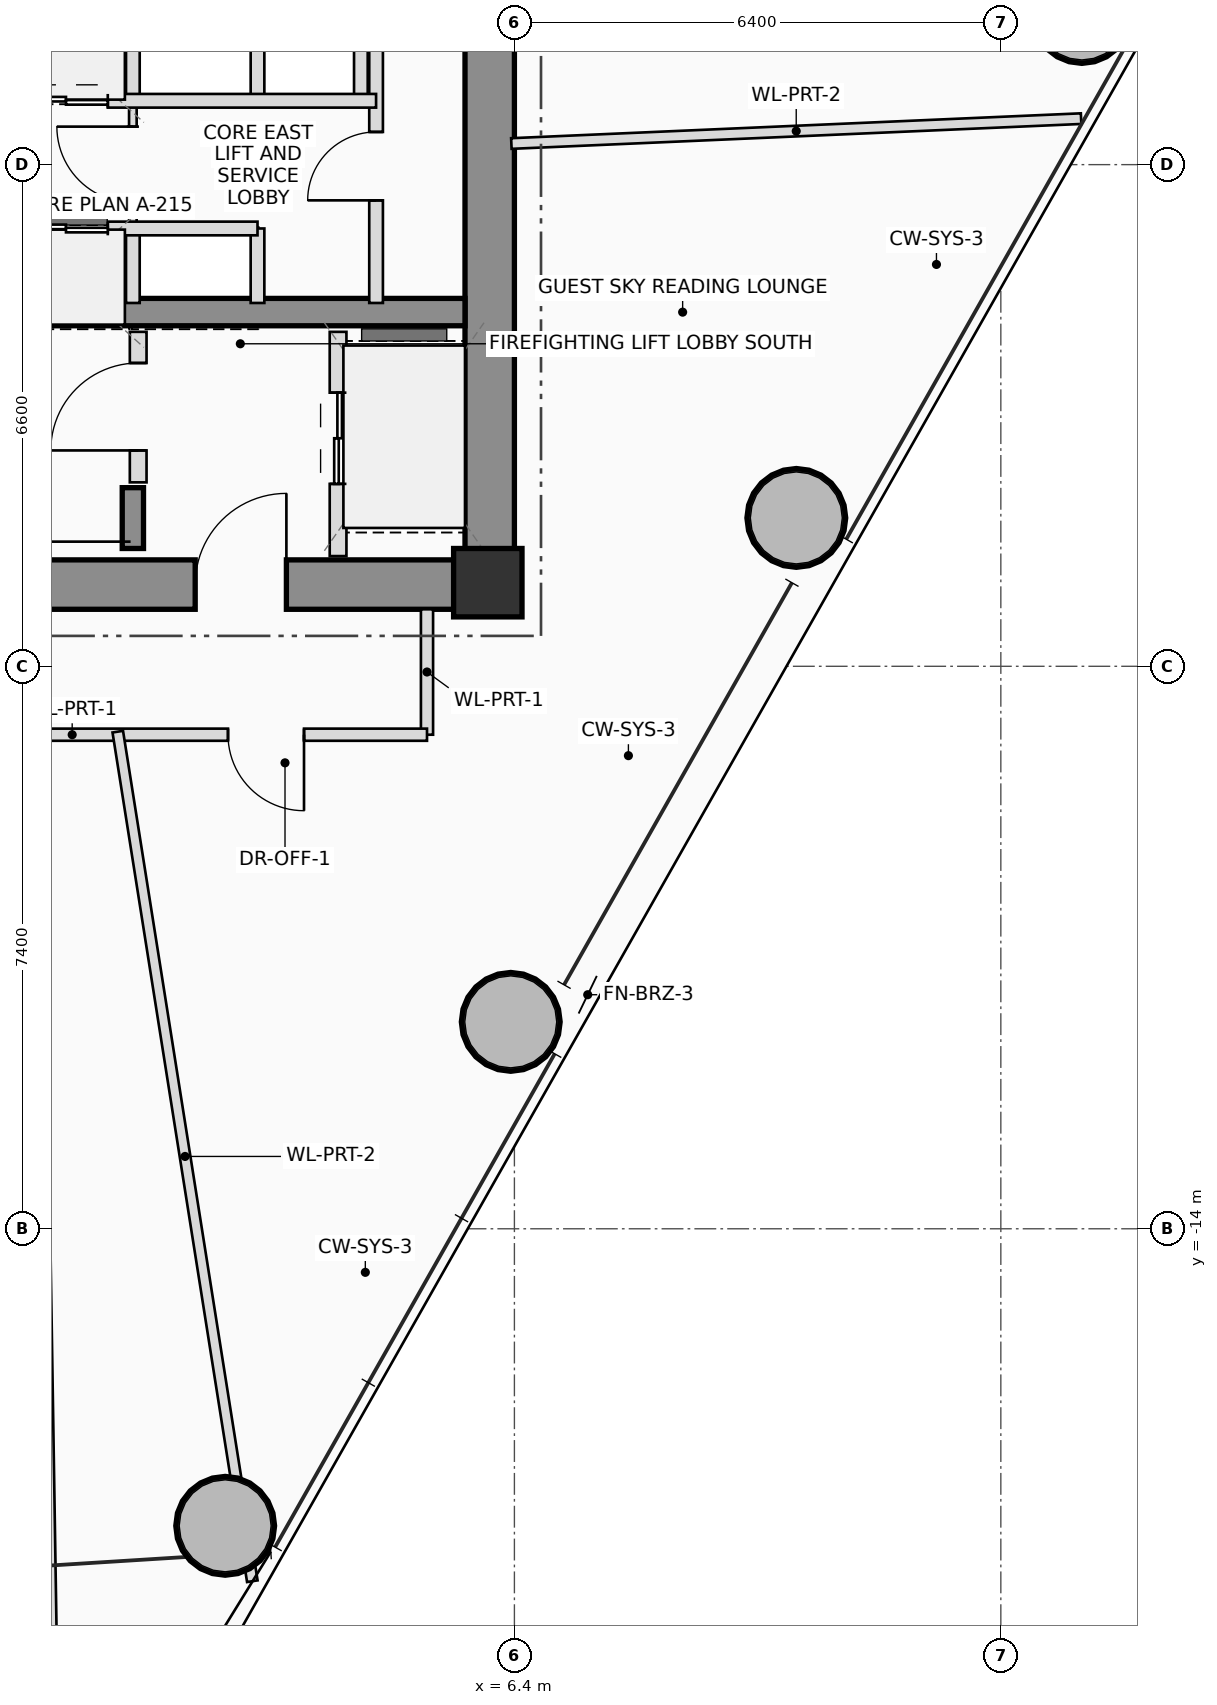
"""IFC4 building model, lengths in metres.
Left out: names, types, materials, properties, quantities, classifications, styles, units other than length and angle.
Written with IfcOpenShell. Run it as: python <this file> out.ifc"""

import sys

from ifc_helpers import new_model, si_unit, direction, frame, frame_2d, origin, origin_2d, place, context, subcontext, project, spatial, rectangle, hollow_circle, extrude, source, transform, mapped, element, fill, save


model = new_model("IFC4")
c1 = context("Model", 3, precision=1e-05, world=origin(), true_north=direction((0.0, 1.0)))
c2 = subcontext(c1, "Body", "Model", "MODEL_VIEW")
j1 = project(units=[si_unit("LENGTHUNIT", "METRE"), si_unit("PLANEANGLEUNIT", "RADIAN")], contexts=[c1])
p1 = place(None, origin())
s1 = spatial("IfcSite", under=j1, at=p1, CompositionType="ELEMENT")
p2 = place(p1, origin())
s2 = spatial("IfcBuilding", under=s1, at=p2, CompositionType="ELEMENT")
p3 = place(p2, frame((0.0, 0.0, 158.75)))
s3 = spatial("IfcBuildingStorey", under=s2, at=p3, CompositionType="ELEMENT", Elevation=158.75)
m1 = source(origin(), c2, "Body", "SweptSolid", [
    extrude(rectangle(XDim=0.9, YDim=0.9, at=origin_2d()), origin(), (0.0, 0.0, 1.0), 3.45),
])
p4 = place(p3, frame((6.05, -5.5, 0.0), z_axis=(0.0, 0.0, 1.0), x_axis=(1.0, 0.0, 0.0)))
e1 = element("IfcColumn", 1, at=p4, inside=s3, PredefinedType="COLUMN", context=c2, shape_type="MappedRepresentation", body=[
    mapped(m1, transform((0.0, 0.0, 0.0), scale=1.0)),
])
p5 = place(p3, frame((-6.4, -5.525, 0.0), z_axis=(0.0, 0.0, 1.0), x_axis=(1.0, 0.0, 0.0)))
e2 = element("IfcWall", 2, at=p5, inside=s3, PredefinedType="SHEAR", context=c2, shape_type="SweptSolid", body=[
    extrude(rectangle(XDim=12.8, YDim=0.65, at=frame_2d((6.4, 0.0))), origin(), (0.0, 0.0, 1.0), 3.45),
])
p6 = place(p5, frame((8.6, 0.0, 0.0)))
e3 = element("IfcOpeningElement", 3, at=p6, cuts=e2, PredefinedType="OPENING", context=c2, shape_type="SweptSolid", body=[
    extrude(rectangle(XDim=1.2, YDim=2.2, at=frame_2d((0.6, 1.1))), frame((0.0, 0.335, 0.0), z_axis=(0.0, -1.0, 0.0), x_axis=(1.0, 0.0, 0.0)), (0.0, 0.0, 1.0), 0.67),
])
p7 = place(p3, frame((6.075, -5.2, 0.0), z_axis=(0.0, 0.0, 1.0), x_axis=(0.0, 1.0, 0.0)))
e4 = element("IfcWall", 4, at=p7, inside=s3, PredefinedType="SHEAR", context=c2, shape_type="SweptSolid", body=[
    extrude(rectangle(XDim=10.4, YDim=0.65, at=frame_2d((5.2, 0.0))), origin(), (0.0, 0.0, 1.0), 3.45),
])
p8 = place(p3, frame((-5.75, -1.94, 0.0), z_axis=(0.0, 0.0, 1.0), x_axis=(1.0, 0.0, 0.0)))
e5 = element("IfcWall", 5, at=p8, inside=s3, PredefinedType="SHEAR", context=c2, shape_type="SweptSolid", body=[
    extrude(rectangle(XDim=11.5, YDim=0.36, at=frame_2d((5.75, 0.0))), origin(), (0.0, 0.0, 1.0), 3.45),
])
p9 = place(p3, frame((1.38, -5.05, 0.0), z_axis=(0.0, 0.0, 1.0), x_axis=(0.0, 1.0, 0.0)))
e6 = element("IfcWall", 6, at=p9, inside=s3, PredefinedType="SHEAR", context=c2, shape_type="SweptSolid", body=[
    extrude(rectangle(XDim=0.8, YDim=0.28, at=frame_2d((0.4, 0.0))), origin(), (0.0, 0.0, 1.0), 3.45),
])
m2 = source(origin(), c2, "Body", "SweptSolid", [
    extrude(hollow_circle(Radius=0.65, WallThickness=0.045, at=origin_2d()), origin(), (0.0, 0.0, 1.0), 3.45),
])
for number, where, z_axis, x_axis in (
    (7, (2.595, -17.908, 0.0), (0.0, 0.0, 1.0), (1.0, 0.0, 0.0)),
    (8, (6.352, -11.278, 0.0), (0.0, 0.0, 1.0), (1.0, 0.0, 0.0)),
    (9, (10.109, -4.648, 0.0), (0.0, 0.0, 1.0), (1.0, 0.0, 0.0)),
    (10, (13.866, 1.982, 0.0), (0.0, 0.0, 1.0), (1.0, 0.0, 0.0)),
):
    element("IfcColumn", number, at=place(p3, frame(where, z_axis=z_axis, x_axis=x_axis)), inside=s3, PredefinedType="COLUMN", context=c2, shape_type="MappedRepresentation", body=[
        mapped(m2, transform((0.0, 0.0, 0.0), scale=1.0)),
    ])
p10 = place(p3, frame((1.45, -4.18, 0.0), z_axis=(0.0, 0.0, 1.0), x_axis=(0.0, 1.0, 0.0)))
e11 = element("IfcWall", 11, at=p10, inside=s3, PredefinedType="PLUMBINGWALL", context=c2, shape_type="SweptSolid", body=[
    extrude(rectangle(XDim=1.98, YDim=0.22, at=frame_2d((0.99, 0.0))), origin(), (0.0, 0.0, 1.0), 3.25),
])
p11 = place(p10, frame((0.42, 0.0, 0.0)))
e12 = element("IfcOpeningElement", 12, at=p11, cuts=e11, PredefinedType="OPENING", context=c2, shape_type="SweptSolid", body=[
    extrude(rectangle(XDim=1.15, YDim=2.15, at=frame_2d((0.575, 1.075))), frame((0.0, 0.12, 0.0), z_axis=(0.0, -1.0, 0.0), x_axis=(1.0, 0.0, 0.0)), (0.0, 0.0, 1.0), 0.24),
])
p12 = place(p3, frame((4.08, -5.15, 0.0), z_axis=(0.0, 0.0, 1.0), x_axis=(0.0, 1.0, 0.0)))
e13 = element("IfcWall", 13, at=p12, inside=s3, PredefinedType="PLUMBINGWALL", context=c2, shape_type="SweptSolid", body=[
    extrude(rectangle(XDim=2.95, YDim=0.22, at=frame_2d((1.475, 0.0))), origin(), (0.0, 0.0, 1.0), 3.25),
])
p13 = place(p12, frame((0.95, 0.0, 0.0)))
e14 = element("IfcOpeningElement", 14, at=p13, cuts=e13, PredefinedType="OPENING", context=c2, shape_type="SweptSolid", body=[
    extrude(rectangle(XDim=1.2, YDim=2.25, at=frame_2d((0.6, 1.125))), frame((0.0, 0.12, 0.0), z_axis=(0.0, -1.0, 0.0), x_axis=(1.0, 0.0, 0.0)), (0.0, 0.0, 1.0), 0.24),
])
p14 = place(p3, frame((1.38, -0.84, 0.0), z_axis=(0.0, 0.0, 1.0), x_axis=(0.0, 1.0, 0.0)))
e15 = element("IfcWall", 15, at=p14, inside=s3, PredefinedType="PARTITIONING", context=c2, shape_type="SweptSolid", body=[
    extrude(rectangle(XDim=1.68, YDim=0.1, at=frame_2d((0.84, 0.0))), origin(), (0.0, 0.0, 1.0), 3.25),
])
p15 = place(p14, frame((0.34, 0.0, 0.0)))
e16 = element("IfcOpeningElement", 16, at=p15, cuts=e15, PredefinedType="OPENING", context=c2, shape_type="SweptSolid", body=[
    extrude(rectangle(XDim=1.0, YDim=2.25, at=frame_2d((0.5, 1.125))), frame((0.0, 0.06, 0.0), z_axis=(0.0, -1.0, 0.0), x_axis=(1.0, 0.0, 0.0)), (0.0, 0.0, 1.0), 0.12),
])
for number, where, z_axis, x_axis in (
    (17, (1.38, 0.84, 0.0), (0.0, 0.0, 1.0), (0.0, 1.0, 0.0)),
    (18, (1.38, -1.82, 0.0), (0.0, 0.0, 1.0), (0.0, 1.0, 0.0)),
    (19, (3.02, 0.84, 0.0), (0.0, 0.0, 1.0), (0.0, 1.0, 0.0)),
    (20, (4.38, 0.84, 0.0), (0.0, 0.0, 1.0), (0.0, 1.0, 0.0)),
    (21, (3.02, -1.82, 0.0), (0.0, 0.0, 1.0), (0.0, 1.0, 0.0)),
):
    element("IfcWall", number, at=place(p3, frame(where, z_axis=z_axis, x_axis=x_axis)), inside=s3, PredefinedType="PLUMBINGWALL", context=c2, shape_type="SweptSolid", body=[
        extrude(rectangle(XDim=0.98, YDim=0.18, at=frame_2d((0.49, 0.0))), origin(), (0.0, 0.0, 1.0), 3.25),
    ])
p16 = place(p3, frame((4.58, -1.82, 0.0), z_axis=(0.0, 0.0, 1.0), x_axis=(0.0, 1.0, 0.0)))
e22 = element("IfcWall", 22, at=p16, inside=s3, PredefinedType="PLUMBINGWALL", context=c2, shape_type="SweptSolid", body=[
    extrude(rectangle(XDim=3.64, YDim=0.18, at=frame_2d((1.82, 0.0))), origin(), (0.0, 0.0, 1.0), 3.25),
])
p17 = place(p16, frame((1.35, 0.0, 0.0)))
e23 = element("IfcOpeningElement", 23, at=p17, cuts=e22, PredefinedType="OPENING", context=c2, shape_type="SweptSolid", body=[
    extrude(rectangle(XDim=0.9, YDim=2.05, at=frame_2d((0.45, 1.025))), frame((0.0, 0.1, 0.0), z_axis=(0.0, -1.0, 0.0), x_axis=(1.0, 0.0, 0.0)), (0.0, 0.0, 1.0), 0.2),
])
p18 = place(p3, frame((-5.68, 0.84, 0.0), z_axis=(0.0, 0.0, 1.0), x_axis=(1.0, 0.0, 0.0)))
e24 = element("IfcWall", 24, at=p18, inside=s3, PredefinedType="PLUMBINGWALL", context=c2, shape_type="SweptSolid", body=[
    extrude(rectangle(XDim=10.26, YDim=0.18, at=frame_2d((5.13, 0.0))), origin(), (0.0, 0.0, 1.0), 3.25),
])
p19 = place(p18, frame((1.08, 0.0, 0.0)))
e25 = element("IfcOpeningElement", 25, at=p19, cuts=e24, PredefinedType="OPENING", context=c2, shape_type="SweptSolid", body=[
    extrude(rectangle(XDim=0.9, YDim=2.05, at=frame_2d((0.45, 1.025))), frame((0.0, 0.1, 0.0), z_axis=(0.0, -1.0, 0.0), x_axis=(1.0, 0.0, 0.0)), (0.0, 0.0, 1.0), 0.2),
])
p20 = place(p18, frame((3.93, 0.0, 0.0)))
e26 = element("IfcOpeningElement", 26, at=p20, cuts=e24, PredefinedType="OPENING", context=c2, shape_type="SweptSolid", body=[
    extrude(rectangle(XDim=1.1, YDim=2.2, at=frame_2d((0.55, 1.1))), frame((0.0, 0.1, 0.0), z_axis=(0.0, -1.0, 0.0), x_axis=(1.0, 0.0, 0.0)), (0.0, 0.0, 1.0), 0.2),
])
p21 = place(p18, frame((5.63, 0.0, 0.0)))
e27 = element("IfcOpeningElement", 27, at=p21, cuts=e24, PredefinedType="OPENING", context=c2, shape_type="SweptSolid", body=[
    extrude(rectangle(XDim=1.1, YDim=2.2, at=frame_2d((0.55, 1.1))), frame((0.0, 0.1, 0.0), z_axis=(0.0, -1.0, 0.0), x_axis=(1.0, 0.0, 0.0)), (0.0, 0.0, 1.0), 0.2),
])
p22 = place(p3, frame((-5.68, -0.84, 0.0), z_axis=(0.0, 0.0, 1.0), x_axis=(1.0, 0.0, 0.0)))
e28 = element("IfcWall", 28, at=p22, inside=s3, PredefinedType="PLUMBINGWALL", context=c2, shape_type="SweptSolid", body=[
    extrude(rectangle(XDim=8.7, YDim=0.18, at=frame_2d((4.35, 0.0))), origin(), (0.0, 0.0, 1.0), 3.25),
])
p23 = place(p22, frame((1.68, 0.0, 0.0)))
e29 = element("IfcOpeningElement", 29, at=p23, cuts=e28, PredefinedType="OPENING", context=c2, shape_type="SweptSolid", body=[
    extrude(rectangle(XDim=0.9, YDim=2.05, at=frame_2d((0.45, 1.025))), frame((0.0, 0.1, 0.0), z_axis=(0.0, -1.0, 0.0), x_axis=(1.0, 0.0, 0.0)), (0.0, 0.0, 1.0), 0.2),
])
p24 = place(p22, frame((3.93, 0.0, 0.0)))
e30 = element("IfcOpeningElement", 30, at=p24, cuts=e28, PredefinedType="OPENING", context=c2, shape_type="SweptSolid", body=[
    extrude(rectangle(XDim=1.1, YDim=2.2, at=frame_2d((0.55, 1.1))), frame((0.0, 0.1, 0.0), z_axis=(0.0, -1.0, 0.0), x_axis=(1.0, 0.0, 0.0)), (0.0, 0.0, 1.0), 0.2),
])
p25 = place(p22, frame((5.63, 0.0, 0.0)))
e31 = element("IfcOpeningElement", 31, at=p25, cuts=e28, PredefinedType="OPENING", context=c2, shape_type="SweptSolid", body=[
    extrude(rectangle(XDim=1.1, YDim=2.2, at=frame_2d((0.55, 1.1))), frame((0.0, 0.1, 0.0), z_axis=(0.0, -1.0, 0.0), x_axis=(1.0, 0.0, 0.0)), (0.0, 0.0, 1.0), 0.2),
])
p26 = place(p3, frame((5.25, -5.85, 0.0), z_axis=(0.0, 0.0, 1.0), x_axis=(0.0, -1.0, 0.0)))
e32 = element("IfcWall", 32, at=p26, inside=s3, PredefinedType="PARTITIONING", context=c2, shape_type="SweptSolid", body=[
    extrude(rectangle(XDim=1.65, YDim=0.16, at=frame_2d((0.825, 0.0))), origin(), (0.0, 0.0, 1.0), 3.25),
])
p27 = place(p3, frame((5.25, -7.5, 0.0), z_axis=(0.0, 0.0, 1.0), x_axis=(-1.0, 0.0, 0.0)))
e33 = element("IfcWall", 33, at=p27, inside=s3, PredefinedType="PARTITIONING", context=c2, shape_type="SweptSolid", body=[
    extrude(rectangle(XDim=11.61, YDim=0.16, at=frame_2d((5.805, 0.0))), origin(), (0.0, 0.0, 1.0), 2.605),
])
p28 = place(p27, frame((1.618, 0.0, 0.0)))
e34 = element("IfcOpeningElement", 34, at=p28, cuts=e33, PredefinedType="OPENING", context=c2, shape_type="SweptSolid", body=[
    extrude(rectangle(XDim=1.0, YDim=2.25, at=frame_2d((0.5, 1.125))), frame((0.0, 0.09, 0.0), z_axis=(0.0, -1.0, 0.0), x_axis=(1.0, 0.0, 0.0)), (0.0, 0.0, 1.0), 0.18),
])
p29 = place(p27, frame((6.719, 0.0, 0.0)))
e35 = element("IfcOpeningElement", 35, at=p29, cuts=e33, PredefinedType="OPENING", context=c2, shape_type="SweptSolid", body=[
    extrude(rectangle(XDim=1.0, YDim=2.25, at=frame_2d((0.5, 1.125))), frame((0.0, 0.09, 0.0), z_axis=(0.0, -1.0, 0.0), x_axis=(1.0, 0.0, 0.0)), (0.0, 0.0, 1.0), 0.18),
])
p30 = place(p3, frame((6.36, 0.278, 0.0), z_axis=(0.0, 0.0, 1.0), x_axis=(0.999047543566, 0.043634913719, 0.0)))
e36 = element("IfcWall", 36, at=p30, inside=s3, PredefinedType="PARTITIONING", context=c2, shape_type="SweptSolid", body=[
    extrude(rectangle(XDim=7.503, YDim=0.14, at=frame_2d((3.751, 0.0))), origin(), (0.0, 0.0, 1.0), 2.605),
])
p31 = place(p3, frame((0.118, -7.46, 0.0), z_axis=(0.0, 0.0, 1.0), x_axis=(0.015859383496, -0.999874232069, 0.0)))
e37 = element("IfcWall", 37, at=p31, inside=s3, PredefinedType="PARTITIONING", context=c2, shape_type="SweptSolid", body=[
    extrude(rectangle(XDim=13.655, YDim=0.14, at=frame_2d((6.827, 0.0))), origin(), (0.0, 0.0, 1.0), 2.765),
])
p32 = place(p3, frame((1.181, -7.46, 0.0), z_axis=(0.0, 0.0, 1.0), x_axis=(0.156458885844, -0.98768447241, 0.0)))
e38 = element("IfcWall", 38, at=p32, inside=s3, PredefinedType="PARTITIONING", context=c2, shape_type="SweptSolid", body=[
    extrude(rectangle(XDim=11.316, YDim=0.14, at=frame_2d((5.658, 0.0))), origin(), (0.0, 0.0, 1.0), 2.605),
])
p33 = place(p6, origin())
e39 = element("IfcDoor", 39, at=p33, inside=s3, OperationType="SINGLE_SWING_RIGHT", PredefinedType="DOOR", context=c2, shape_type="SweptSolid", body=[
    extrude(rectangle(XDim=1.2, YDim=2.2, at=frame_2d((0.6, 1.1))), frame((0.0, 0.025, 0.0), z_axis=(0.0, -1.0, 0.0), x_axis=(1.0, 0.0, 0.0)), (0.0, 0.0, 1.0), 0.05),
])
fill(e3, e39)
p34 = place(p11, origin())
e40 = element("IfcDoor", 40, at=p34, inside=s3, OperationType="SINGLE_SWING_LEFT", PredefinedType="DOOR", context=c2, shape_type="SweptSolid", body=[
    extrude(rectangle(XDim=1.15, YDim=2.15, at=frame_2d((0.575, 1.075))), frame((0.0, 0.025, 0.0), z_axis=(0.0, -1.0, 0.0), x_axis=(1.0, 0.0, 0.0)), (0.0, 0.0, 1.0), 0.05),
])
fill(e12, e40)
p35 = place(p13, origin())
e41 = element("IfcDoor", 41, at=p35, inside=s3, OperationType="DOUBLE_DOOR_SLIDING", PredefinedType="DOOR", context=c2, shape_type="SweptSolid", body=[
    extrude(rectangle(XDim=1.2, YDim=2.25, at=frame_2d((0.6, 1.125))), frame((0.0, 0.025, 0.0), z_axis=(0.0, -1.0, 0.0), x_axis=(1.0, 0.0, 0.0)), (0.0, 0.0, 1.0), 0.05),
])
fill(e14, e41)
p36 = place(p15, origin())
e42 = element("IfcDoor", 42, at=p36, inside=s3, OperationType="SINGLE_SWING_RIGHT", PredefinedType="DOOR", context=c2, shape_type="SweptSolid", body=[
    extrude(rectangle(XDim=1.0, YDim=2.25, at=frame_2d((0.5, 1.125))), frame((0.0, 0.025, 0.0), z_axis=(0.0, -1.0, 0.0), x_axis=(1.0, 0.0, 0.0)), (0.0, 0.0, 1.0), 0.05),
])
fill(e16, e42)
p37 = place(p17, origin())
e43 = element("IfcDoor", 43, at=p37, inside=s3, OperationType="SINGLE_SWING_LEFT", PredefinedType="DOOR", context=c2, shape_type="SweptSolid", body=[
    extrude(rectangle(XDim=0.9, YDim=2.05, at=frame_2d((0.45, 1.025))), frame((0.0, 0.025, 0.0), z_axis=(0.0, -1.0, 0.0), x_axis=(1.0, 0.0, 0.0)), (0.0, 0.0, 1.0), 0.05),
])
fill(e23, e43)
p38 = place(p21, origin())
e44 = element("IfcDoor", 44, at=p38, inside=s3, OperationType="DOUBLE_DOOR_SLIDING", PredefinedType="DOOR", context=c2, shape_type="SweptSolid", body=[
    extrude(rectangle(XDim=1.1, YDim=2.2, at=frame_2d((0.55, 1.1))), frame((0.0, 0.025, 0.0), z_axis=(0.0, -1.0, 0.0), x_axis=(1.0, 0.0, 0.0)), (0.0, 0.0, 1.0), 0.05),
])
fill(e27, e44)
p39 = place(p25, origin())
e45 = element("IfcDoor", 45, at=p39, inside=s3, OperationType="DOUBLE_DOOR_SLIDING", PredefinedType="DOOR", context=c2, shape_type="SweptSolid", body=[
    extrude(rectangle(XDim=1.1, YDim=2.2, at=frame_2d((0.55, 1.1))), frame((0.0, 0.025, 0.0), z_axis=(0.0, -1.0, 0.0), x_axis=(1.0, 0.0, 0.0)), (0.0, 0.0, 1.0), 0.05),
])
fill(e31, e45)
p40 = place(p28, origin())
e46 = element("IfcDoor", 46, at=p40, inside=s3, OperationType="SINGLE_SWING_LEFT", PredefinedType="DOOR", context=c2, shape_type="SweptSolid", body=[
    extrude(rectangle(XDim=1.0, YDim=2.25, at=frame_2d((0.5, 1.125))), frame((0.0, 0.025, 0.0), z_axis=(0.0, -1.0, 0.0), x_axis=(1.0, 0.0, 0.0)), (0.0, 0.0, 1.0), 0.05),
])
fill(e34, e46)
save(model, sys.argv[1])
